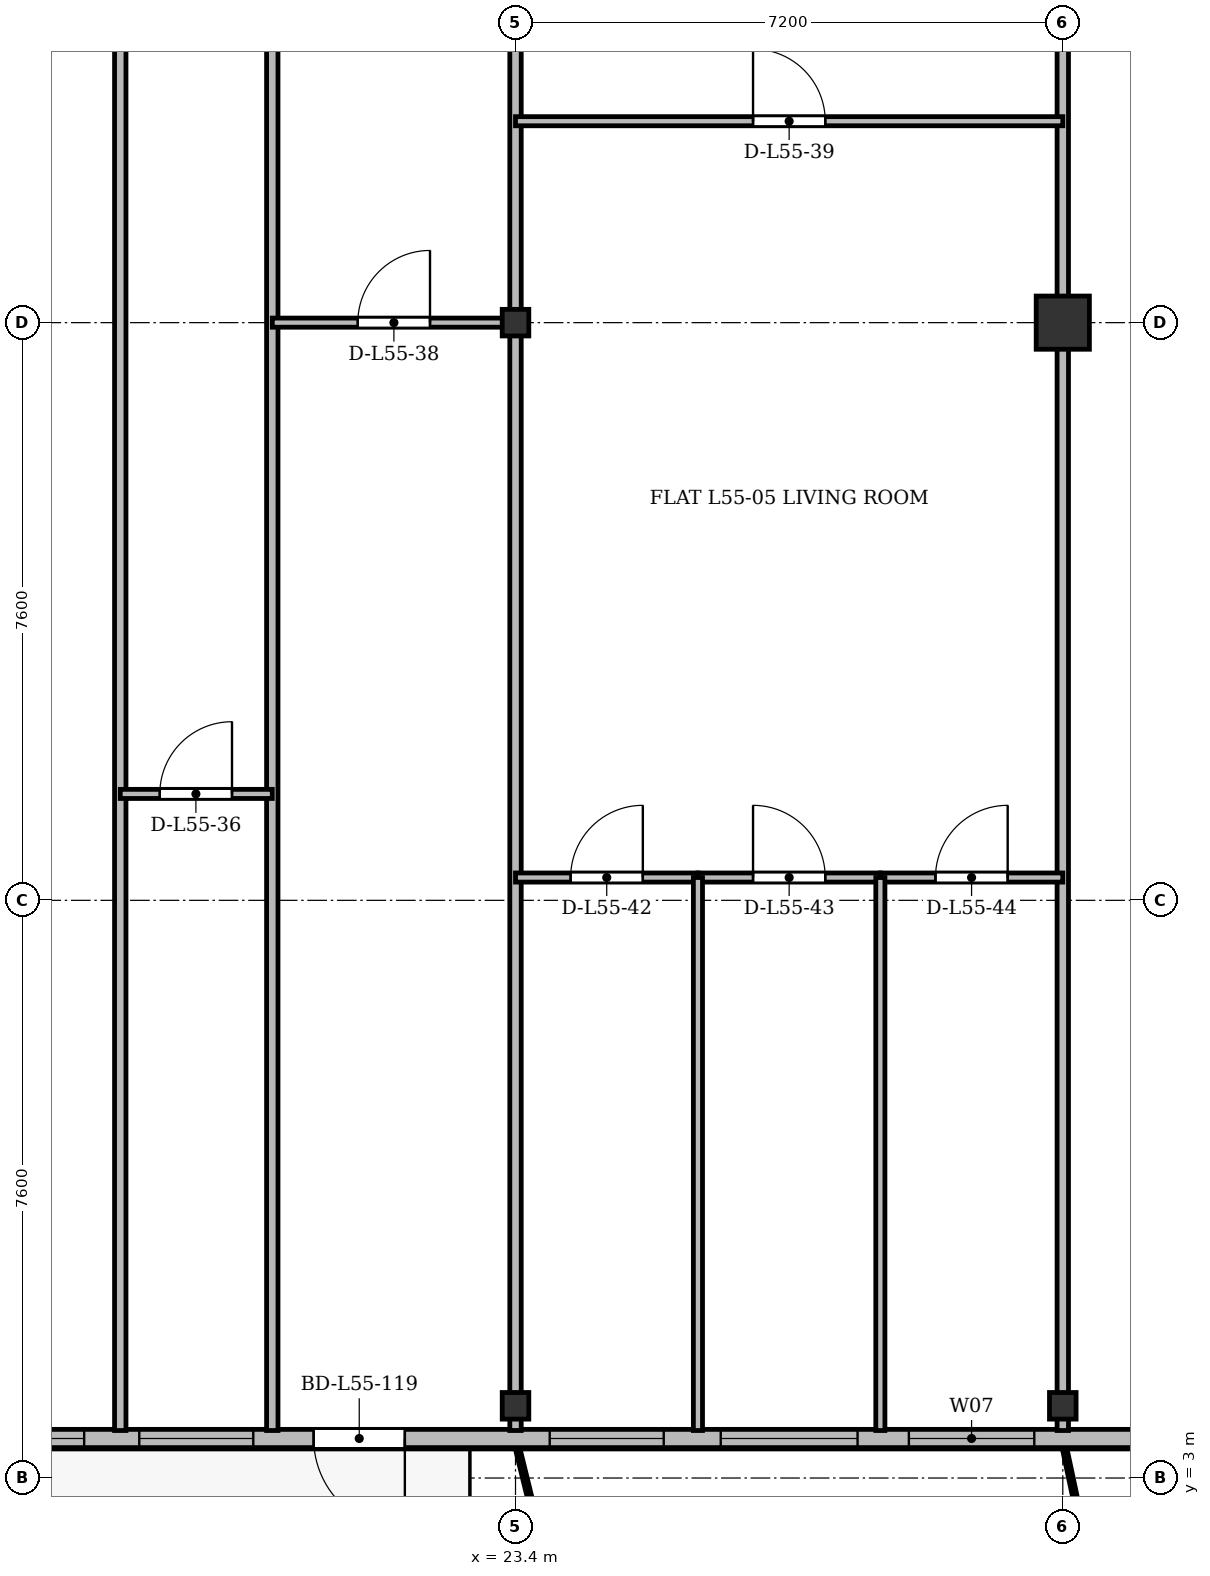
"""IFC4 building model, lengths in metres.
Left out: names, types, materials, properties, quantities, classifications, styles, units other than length and angle.
Written with IfcOpenShell. Run it as: python <this file> out.ifc"""

import sys

from ifc_helpers import new_model, si_unit, direction, frame, frame_2d, origin, origin_2d, place, context, subcontext, project, spatial, rectangle, i_section, extrude, source, transform, mapped, element, fill, save


model = new_model("IFC4")
c1 = context("Model", 3, precision=1e-05, world=origin(), true_north=direction((0.0, 1.0)))
c2 = subcontext(c1, "Body", "Model", "MODEL_VIEW")
j1 = project(units=[si_unit("LENGTHUNIT", "METRE"), si_unit("PLANEANGLEUNIT", "RADIAN")], contexts=[c1])
p1 = place(None, origin())
s1 = spatial("IfcSite", under=j1, at=p1, CompositionType="ELEMENT")
p2 = place(p1, origin())
s2 = spatial("IfcBuilding", under=s1, at=p2, CompositionType="ELEMENT")
p3 = place(p2, frame((0.0, 0.0, 212.1)))
s3 = spatial("IfcBuildingStorey", under=s2, at=p3, CompositionType="ELEMENT", Elevation=212.1)
m1 = source(origin(), c2, "Body", "SweptSolid", [
    extrude(i_section(OverallWidth=0.35, OverallDepth=0.35, WebThickness=0.018, FlangeThickness=0.028, at=origin_2d()), origin(), (0.0, 0.0, 1.0), 3.6),
])
for number, where, z_axis, x_axis in (
    (1, (23.4, 3.95, 0.0), (0.0, 0.0, 1.0), (1.0, 0.0, 0.0)),
    (2, (23.4, 18.2, 0.0), (0.0, 0.0, 1.0), (1.0, 0.0, 0.0)),
    (3, (30.6, 3.95, 0.0), (0.0, 0.0, 1.0), (1.0, 0.0, 0.0)),
):
    element("IfcColumn", number, at=place(p3, frame(where, z_axis=z_axis, x_axis=x_axis)), inside=s3, PredefinedType="COLUMN", context=c2, shape_type="MappedRepresentation", body=[
        mapped(m1, transform((0.0, 0.0, 0.0), x_axis=(1.0, 0.0, 0.0), y_axis=(0.0, 1.0, 0.0), z_axis=(0.0, 0.0, 1.0), scale=1.0)),
    ])
m2 = source(origin(), c2, "Body", "SweptSolid", [
    extrude(rectangle(XDim=0.7, YDim=0.7, at=origin_2d()), origin(), (0.0, 0.0, 1.0), 3.6),
])
p4 = place(p3, frame((30.6, 18.2, 0.0), z_axis=(0.0, 0.0, 1.0), x_axis=(1.0, 0.0, 0.0)))
e4 = element("IfcColumn", 4, at=p4, inside=s3, PredefinedType="COLUMN", context=c2, shape_type="MappedRepresentation", body=[
    mapped(m2, transform((0.0, 0.0, 0.0), x_axis=(1.0, 0.0, 0.0), y_axis=(0.0, 1.0, 0.0), z_axis=(0.0, 0.0, 1.0), scale=1.0)),
])
p5 = place(p3, frame((63.4, 3.52, 0.0), z_axis=(0.0, 0.0, 1.0), x_axis=(-1.0, 0.0, 0.0)))
e5 = element("IfcWall", 5, at=p5, inside=s3, PredefinedType="SOLIDWALL", context=c2, shape_type="SweptSolid", body=[
    extrude(rectangle(XDim=52.4, YDim=0.24, at=frame_2d((26.2, 0.0))), origin(), (0.0, 0.0, 1.0), 3.36),
])
p6 = place(p5, frame((1.445, 0.0, 0.9)))
e6 = element("IfcOpeningElement", 6, at=p6, cuts=e5, PredefinedType="OPENING", context=c2, shape_type="SweptSolid", body=[
    extrude(rectangle(XDim=1.8, YDim=1.8, at=frame_2d((0.9, 0.9))), frame((0.0, 0.13, 0.0), z_axis=(0.0, -1.0, 0.0), x_axis=(1.0, 0.0, 0.0)), (0.0, 0.0, 1.0), 0.26),
])
p7 = place(p5, frame((5.15, 0.0, 0.9)))
e7 = element("IfcOpeningElement", 7, at=p7, cuts=e5, PredefinedType="OPENING", context=c2, shape_type="SweptSolid", body=[
    extrude(rectangle(XDim=1.5, YDim=1.75, at=frame_2d((0.75, 0.875))), frame((0.0, 0.13, 0.0), z_axis=(0.0, -1.0, 0.0), x_axis=(1.0, 0.0, 0.0)), (0.0, 0.0, 1.0), 0.26),
])
p8 = place(p5, frame((7.45, 0.0, 0.9)))
e8 = element("IfcOpeningElement", 8, at=p8, cuts=e5, PredefinedType="OPENING", context=c2, shape_type="SweptSolid", body=[
    extrude(rectangle(XDim=1.5, YDim=1.75, at=frame_2d((0.75, 0.875))), frame((0.0, 0.13, 0.0), z_axis=(0.0, -1.0, 0.0), x_axis=(1.0, 0.0, 0.0)), (0.0, 0.0, 1.0), 0.26),
])
p9 = place(p5, frame((9.8, 0.0, 0.9)))
e9 = element("IfcOpeningElement", 9, at=p9, cuts=e5, PredefinedType="OPENING", context=c2, shape_type="SweptSolid", body=[
    extrude(rectangle(XDim=2.0, YDim=1.95, at=frame_2d((1.0, 0.975))), frame((0.0, 0.13, 0.0), z_axis=(0.0, -1.0, 0.0), x_axis=(1.0, 0.0, 0.0)), (0.0, 0.0, 1.0), 0.26),
])
p10 = place(p5, frame((14.217, 0.0, 0.0)))
e10 = element("IfcOpeningElement", 10, at=p10, cuts=e5, PredefinedType="OPENING", context=c2, shape_type="SweptSolid", body=[
    extrude(rectangle(XDim=1.2, YDim=2.2, at=frame_2d((0.6, 1.1))), frame((0.0, 0.13, 0.0), z_axis=(0.0, -1.0, 0.0), x_axis=(1.0, 0.0, 0.0)), (0.0, 0.0, 1.0), 0.26),
])
p11 = place(p5, frame((20.034, 0.0, 0.9)))
e11 = element("IfcOpeningElement", 11, at=p11, cuts=e5, PredefinedType="OPENING", context=c2, shape_type="SweptSolid", body=[
    extrude(rectangle(XDim=1.8, YDim=1.8, at=frame_2d((0.9, 0.9))), frame((0.0, 0.13, 0.0), z_axis=(0.0, -1.0, 0.0), x_axis=(1.0, 0.0, 0.0)), (0.0, 0.0, 1.0), 0.26),
])
p12 = place(p5, frame((22.5, 0.0, 0.9)))
e12 = element("IfcOpeningElement", 12, at=p12, cuts=e5, PredefinedType="OPENING", context=c2, shape_type="SweptSolid", body=[
    extrude(rectangle(XDim=2.2, YDim=1.8, at=frame_2d((1.1, 0.9))), frame((0.0, 0.13, 0.0), z_axis=(0.0, -1.0, 0.0), x_axis=(1.0, 0.0, 0.0)), (0.0, 0.0, 1.0), 0.26),
])
p13 = place(p5, frame((25.517, 0.0, 0.9)))
e13 = element("IfcOpeningElement", 13, at=p13, cuts=e5, PredefinedType="OPENING", context=c2, shape_type="SweptSolid", body=[
    extrude(rectangle(XDim=1.5, YDim=1.75, at=frame_2d((0.75, 0.875))), frame((0.0, 0.13, 0.0), z_axis=(0.0, -1.0, 0.0), x_axis=(1.0, 0.0, 0.0)), (0.0, 0.0, 1.0), 0.26),
])
p14 = place(p5, frame((29.2, 0.0, 0.9)))
e14 = element("IfcOpeningElement", 14, at=p14, cuts=e5, PredefinedType="OPENING", context=c2, shape_type="SweptSolid", body=[
    extrude(rectangle(XDim=2.0, YDim=1.95, at=frame_2d((1.0, 0.975))), frame((0.0, 0.13, 0.0), z_axis=(0.0, -1.0, 0.0), x_axis=(1.0, 0.0, 0.0)), (0.0, 0.0, 1.0), 0.26),
])
p15 = place(p5, frame((33.175, 0.0, 0.9)))
e15 = element("IfcOpeningElement", 15, at=p15, cuts=e5, PredefinedType="OPENING", context=c2, shape_type="SweptSolid", body=[
    extrude(rectangle(XDim=1.65, YDim=1.85, at=frame_2d((0.825, 0.925))), frame((0.0, 0.13, 0.0), z_axis=(0.0, -1.0, 0.0), x_axis=(1.0, 0.0, 0.0)), (0.0, 0.0, 1.0), 0.26),
])
p16 = place(p5, frame((35.5, 0.0, 0.9)))
e16 = element("IfcOpeningElement", 16, at=p16, cuts=e5, PredefinedType="OPENING", context=c2, shape_type="SweptSolid", body=[
    extrude(rectangle(XDim=1.8, YDim=1.8, at=frame_2d((0.9, 0.9))), frame((0.0, 0.13, 0.0), z_axis=(0.0, -1.0, 0.0), x_axis=(1.0, 0.0, 0.0)), (0.0, 0.0, 1.0), 0.26),
])
p17 = place(p5, frame((38.05, 0.0, 0.9)))
e17 = element("IfcOpeningElement", 17, at=p17, cuts=e5, PredefinedType="OPENING", context=c2, shape_type="SweptSolid", body=[
    extrude(rectangle(XDim=1.5, YDim=1.75, at=frame_2d((0.75, 0.875))), frame((0.0, 0.13, 0.0), z_axis=(0.0, -1.0, 0.0), x_axis=(1.0, 0.0, 0.0)), (0.0, 0.0, 1.0), 0.26),
])
p18 = place(p5, frame((41.456, 0.0, 0.0)))
e18 = element("IfcOpeningElement", 18, at=p18, cuts=e5, PredefinedType="OPENING", context=c2, shape_type="SweptSolid", body=[
    extrude(rectangle(XDim=1.2, YDim=2.2, at=frame_2d((0.6, 1.1))), frame((0.0, 0.13, 0.0), z_axis=(0.0, -1.0, 0.0), x_axis=(1.0, 0.0, 0.0)), (0.0, 0.0, 1.0), 0.26),
])
p19 = place(p5, frame((43.45, 0.0, 0.9)))
e19 = element("IfcOpeningElement", 19, at=p19, cuts=e5, PredefinedType="OPENING", context=c2, shape_type="SweptSolid", body=[
    extrude(rectangle(XDim=1.5, YDim=1.75, at=frame_2d((0.75, 0.875))), frame((0.0, 0.13, 0.0), z_axis=(0.0, -1.0, 0.0), x_axis=(1.0, 0.0, 0.0)), (0.0, 0.0, 1.0), 0.26),
])
p20 = place(p5, frame((45.675, 0.0, 0.9)))
e20 = element("IfcOpeningElement", 20, at=p20, cuts=e5, PredefinedType="OPENING", context=c2, shape_type="SweptSolid", body=[
    extrude(rectangle(XDim=1.65, YDim=1.85, at=frame_2d((0.825, 0.925))), frame((0.0, 0.13, 0.0), z_axis=(0.0, -1.0, 0.0), x_axis=(1.0, 0.0, 0.0)), (0.0, 0.0, 1.0), 0.26),
])
p21 = place(p5, frame((49.155, 0.0, 0.9)))
e21 = element("IfcOpeningElement", 21, at=p21, cuts=e5, PredefinedType="OPENING", context=c2, shape_type="SweptSolid", body=[
    extrude(rectangle(XDim=1.8, YDim=1.8, at=frame_2d((0.9, 0.9))), frame((0.0, 0.13, 0.0), z_axis=(0.0, -1.0, 0.0), x_axis=(1.0, 0.0, 0.0)), (0.0, 0.0, 1.0), 0.26),
])
for number, where, z_axis, x_axis in (
    (22, (23.4, 3.625, 0.0), (0.0, 0.0, 1.0), (0.0, 1.0, 0.0)),
    (23, (30.6, 3.625, 0.0), (0.0, 0.0, 1.0), (0.0, 1.0, 0.0)),
):
    element("IfcWall", number, at=place(p3, frame(where, z_axis=z_axis, x_axis=x_axis)), inside=s3, PredefinedType="PARTITIONING", context=c2, shape_type="SweptSolid", body=[
        extrude(rectangle(XDim=27.175, YDim=0.15, at=frame_2d((13.587, 0.0))), origin(), (0.0, 0.0, 1.0), 2.86),
    ])
for number, where, z_axis, x_axis in (
    (24, (18.2, 3.625, 0.0), (0.0, 0.0, 1.0), (0.0, 1.0, 0.0)),
    (25, (20.2, 3.625, 0.0), (0.0, 0.0, 1.0), (0.0, 1.0, 0.0)),
):
    element("IfcWall", number, at=place(p3, frame(where, z_axis=z_axis, x_axis=x_axis)), inside=s3, PredefinedType="PARTITIONING", context=c2, shape_type="SweptSolid", body=[
        extrude(rectangle(XDim=27.175, YDim=0.15, at=frame_2d((13.587, 0.0))), origin(), (0.0, 0.0, 1.0), 2.91),
    ])
p22 = place(p3, frame((18.2, 12.0, 0.0), z_axis=(0.0, 0.0, 1.0), x_axis=(1.0, 0.0, 0.0)))
e26 = element("IfcWall", 26, at=p22, inside=s3, PredefinedType="PARTITIONING", context=c2, shape_type="SweptSolid", body=[
    extrude(rectangle(XDim=2.0, YDim=0.12, at=frame_2d((1.0, 0.0))), origin(), (0.0, 0.0, 1.0), 3.36),
])
p23 = place(p22, frame((0.52, 0.0, 0.0)))
e27 = element("IfcOpeningElement", 27, at=p23, cuts=e26, PredefinedType="OPENING", context=c2, shape_type="SweptSolid", body=[
    extrude(rectangle(XDim=0.95, YDim=2.15, at=frame_2d((0.475, 1.075))), frame((0.0, 0.07, 0.0), z_axis=(0.0, -1.0, 0.0), x_axis=(1.0, 0.0, 0.0)), (0.0, 0.0, 1.0), 0.14),
])
p24 = place(p3, frame((20.2, 18.2, 0.0), z_axis=(0.0, 0.0, 1.0), x_axis=(1.0, 0.0, 0.0)))
e28 = element("IfcWall", 28, at=p24, inside=s3, PredefinedType="PARTITIONING", context=c2, shape_type="SweptSolid", body=[
    extrude(rectangle(XDim=3.2, YDim=0.12, at=frame_2d((1.6, 0.0))), origin(), (0.0, 0.0, 1.0), 2.91),
])
p25 = place(p24, frame((1.125, 0.0, 0.0)))
e29 = element("IfcOpeningElement", 29, at=p25, cuts=e28, PredefinedType="OPENING", context=c2, shape_type="SweptSolid", body=[
    extrude(rectangle(XDim=0.95, YDim=2.15, at=frame_2d((0.475, 1.075))), frame((0.0, 0.07, 0.0), z_axis=(0.0, -1.0, 0.0), x_axis=(1.0, 0.0, 0.0)), (0.0, 0.0, 1.0), 0.14),
])
p26 = place(p3, frame((23.4, 20.85, 0.0), z_axis=(0.0, 0.0, 1.0), x_axis=(1.0, 0.0, 0.0)))
e30 = element("IfcWall", 30, at=p26, inside=s3, PredefinedType="PARTITIONING", context=c2, shape_type="SweptSolid", body=[
    extrude(rectangle(XDim=7.2, YDim=0.12, at=frame_2d((3.6, 0.0))), origin(), (0.0, 0.0, 1.0), 2.86),
])
p27 = place(p26, frame((3.125, 0.0, 0.0)))
e31 = element("IfcOpeningElement", 31, at=p27, cuts=e30, PredefinedType="OPENING", context=c2, shape_type="SweptSolid", body=[
    extrude(rectangle(XDim=0.95, YDim=2.15, at=frame_2d((0.475, 1.075))), frame((0.0, 0.07, 0.0), z_axis=(0.0, -1.0, 0.0), x_axis=(1.0, 0.0, 0.0)), (0.0, 0.0, 1.0), 0.14),
])
p28 = place(p3, frame((23.4, 10.9, 0.0), z_axis=(0.0, 0.0, 1.0), x_axis=(1.0, 0.0, 0.0)))
e32 = element("IfcWall", 32, at=p28, inside=s3, PredefinedType="PARTITIONING", context=c2, shape_type="SweptSolid", body=[
    extrude(rectangle(XDim=2.4, YDim=0.12, at=frame_2d((1.2, 0.0))), origin(), (0.0, 0.0, 1.0), 2.86),
])
p29 = place(p28, frame((0.725, 0.0, 0.0)))
e33 = element("IfcOpeningElement", 33, at=p29, cuts=e32, PredefinedType="OPENING", context=c2, shape_type="SweptSolid", body=[
    extrude(rectangle(XDim=0.95, YDim=2.15, at=frame_2d((0.475, 1.075))), frame((0.0, 0.07, 0.0), z_axis=(0.0, -1.0, 0.0), x_axis=(1.0, 0.0, 0.0)), (0.0, 0.0, 1.0), 0.14),
])
p30 = place(p3, frame((25.8, 10.9, 0.0), z_axis=(0.0, 0.0, 1.0), x_axis=(1.0, 0.0, 0.0)))
e34 = element("IfcWall", 34, at=p30, inside=s3, PredefinedType="PARTITIONING", context=c2, shape_type="SweptSolid", body=[
    extrude(rectangle(XDim=2.4, YDim=0.12, at=frame_2d((1.2, 0.0))), origin(), (0.0, 0.0, 1.0), 3.36),
])
p31 = place(p30, frame((0.725, 0.0, 0.0)))
e35 = element("IfcOpeningElement", 35, at=p31, cuts=e34, PredefinedType="OPENING", context=c2, shape_type="SweptSolid", body=[
    extrude(rectangle(XDim=0.95, YDim=2.15, at=frame_2d((0.475, 1.075))), frame((0.0, 0.07, 0.0), z_axis=(0.0, -1.0, 0.0), x_axis=(1.0, 0.0, 0.0)), (0.0, 0.0, 1.0), 0.14),
])
p32 = place(p3, frame((25.8, 3.625, 0.0), z_axis=(0.0, 0.0, 1.0), x_axis=(0.0, 1.0, 0.0)))
e36 = element("IfcWall", 36, at=p32, inside=s3, PredefinedType="PARTITIONING", context=c2, shape_type="SweptSolid", body=[
    extrude(rectangle(XDim=7.275, YDim=0.12, at=frame_2d((3.637, 0.0))), origin(), (0.0, 0.0, 1.0), 2.91),
])
p33 = place(p3, frame((28.2, 10.9, 0.0), z_axis=(0.0, 0.0, 1.0), x_axis=(1.0, 0.0, 0.0)))
e37 = element("IfcWall", 37, at=p33, inside=s3, PredefinedType="PARTITIONING", context=c2, shape_type="SweptSolid", body=[
    extrude(rectangle(XDim=2.4, YDim=0.12, at=frame_2d((1.2, 0.0))), origin(), (0.0, 0.0, 1.0), 2.86),
])
p34 = place(p33, frame((0.725, 0.0, 0.0)))
e38 = element("IfcOpeningElement", 38, at=p34, cuts=e37, PredefinedType="OPENING", context=c2, shape_type="SweptSolid", body=[
    extrude(rectangle(XDim=0.95, YDim=2.15, at=frame_2d((0.475, 1.075))), frame((0.0, 0.07, 0.0), z_axis=(0.0, -1.0, 0.0), x_axis=(1.0, 0.0, 0.0)), (0.0, 0.0, 1.0), 0.14),
])
p35 = place(p3, frame((28.2, 3.625, 0.0), z_axis=(0.0, 0.0, 1.0), x_axis=(0.0, 1.0, 0.0)))
e39 = element("IfcWall", 39, at=p35, inside=s3, PredefinedType="PARTITIONING", context=c2, shape_type="SweptSolid", body=[
    extrude(rectangle(XDim=7.275, YDim=0.12, at=frame_2d((3.637, 0.0))), origin(), (0.0, 0.0, 1.0), 2.91),
])
m3 = source(origin(), c2, "Body", "SweptSolid", [
    extrude(rectangle(XDim=1.65, YDim=1.85, at=frame_2d((0.825, 0.925))), frame((0.0, 0.03, 0.0), z_axis=(0.0, -1.0, 0.0), x_axis=(1.0, 0.0, 0.0)), (0.0, 0.0, 1.0), 0.06),
])
p36 = place(p15, origin())
e40 = element("IfcWindow", 40, at=p36, inside=s3, PartitioningType="SINGLE_PANEL", PredefinedType="WINDOW", context=c2, shape_type="MappedRepresentation", body=[
    mapped(m3, transform((0.0, 0.0, 0.0), x_axis=(1.0, 0.0, 0.0), y_axis=(0.0, 1.0, 0.0), z_axis=(0.0, 0.0, 1.0), scale=1.0)),
])
fill(e15, e40)
m4 = source(origin(), c2, "Body", "SweptSolid", [
    extrude(rectangle(XDim=1.8, YDim=1.8, at=frame_2d((0.9, 0.9))), frame((0.0, 0.03, 0.0), z_axis=(0.0, -1.0, 0.0), x_axis=(1.0, 0.0, 0.0)), (0.0, 0.0, 1.0), 0.06),
])
p37 = place(p16, origin())
e41 = element("IfcWindow", 41, at=p37, inside=s3, PartitioningType="SINGLE_PANEL", PredefinedType="WINDOW", context=c2, shape_type="MappedRepresentation", body=[
    mapped(m4, transform((0.0, 0.0, 0.0), x_axis=(1.0, 0.0, 0.0), y_axis=(0.0, 1.0, 0.0), z_axis=(0.0, 0.0, 1.0), scale=1.0)),
])
fill(e16, e41)
m5 = source(origin(), c2, "Body", "SweptSolid", [
    extrude(rectangle(XDim=1.5, YDim=1.75, at=frame_2d((0.75, 0.875))), frame((0.0, 0.03, 0.0), z_axis=(0.0, -1.0, 0.0), x_axis=(1.0, 0.0, 0.0)), (0.0, 0.0, 1.0), 0.06),
])
p38 = place(p17, origin())
e42 = element("IfcWindow", 42, at=p38, inside=s3, PartitioningType="SINGLE_PANEL", PredefinedType="WINDOW", context=c2, shape_type="MappedRepresentation", body=[
    mapped(m5, transform((0.0, 0.0, 0.0), x_axis=(1.0, 0.0, 0.0), y_axis=(0.0, 1.0, 0.0), z_axis=(0.0, 0.0, 1.0), scale=1.0)),
])
fill(e17, e42)
m6 = source(origin(), c2, "Body", "SweptSolid", [
    extrude(rectangle(XDim=1.2, YDim=2.2, at=frame_2d((0.6, 1.1))), frame((0.0, 0.025, 0.0), z_axis=(0.0, -1.0, 0.0), x_axis=(1.0, 0.0, 0.0)), (0.0, 0.0, 1.0), 0.05),
])
p39 = place(p18, origin())
e43 = element("IfcDoor", 43, at=p39, inside=s3, OperationType="SINGLE_SWING_LEFT", PredefinedType="DOOR", context=c2, shape_type="MappedRepresentation", body=[
    mapped(m6, transform((0.0, 0.0, 0.0), x_axis=(1.0, 0.0, 0.0), y_axis=(0.0, 1.0, 0.0), z_axis=(0.0, 0.0, 1.0), scale=1.0)),
])
fill(e18, e43)
p40 = place(p19, origin())
e44 = element("IfcWindow", 44, at=p40, inside=s3, PartitioningType="SINGLE_PANEL", PredefinedType="WINDOW", context=c2, shape_type="MappedRepresentation", body=[
    mapped(m5, transform((0.0, 0.0, 0.0), x_axis=(1.0, 0.0, 0.0), y_axis=(0.0, 1.0, 0.0), z_axis=(0.0, 0.0, 1.0), scale=1.0)),
])
fill(e19, e44)
p41 = place(p20, origin())
e45 = element("IfcWindow", 45, at=p41, inside=s3, PartitioningType="SINGLE_PANEL", PredefinedType="WINDOW", context=c2, shape_type="MappedRepresentation", body=[
    mapped(m3, transform((0.0, 0.0, 0.0), x_axis=(1.0, 0.0, 0.0), y_axis=(0.0, 1.0, 0.0), z_axis=(0.0, 0.0, 1.0), scale=1.0)),
])
fill(e20, e45)
m7 = source(origin(), c2, "Body", "SweptSolid", [
    extrude(rectangle(XDim=0.95, YDim=2.15, at=frame_2d((0.475, 1.075))), frame((0.0, 0.025, 0.0), z_axis=(0.0, -1.0, 0.0), x_axis=(1.0, 0.0, 0.0)), (0.0, 0.0, 1.0), 0.05),
])
p42 = place(p23, origin())
e46 = element("IfcDoor", 46, at=p42, inside=s3, OperationType="SINGLE_SWING_RIGHT", PredefinedType="DOOR", context=c2, shape_type="MappedRepresentation", body=[
    mapped(m7, transform((0.0, 0.0, 0.0), x_axis=(1.0, 0.0, 0.0), y_axis=(0.0, 1.0, 0.0), z_axis=(0.0, 0.0, 1.0), scale=1.0)),
])
fill(e27, e46)
p43 = place(p25, origin())
e47 = element("IfcDoor", 47, at=p43, inside=s3, OperationType="SINGLE_SWING_RIGHT", PredefinedType="DOOR", context=c2, shape_type="MappedRepresentation", body=[
    mapped(m7, transform((0.0, 0.0, 0.0), x_axis=(1.0, 0.0, 0.0), y_axis=(0.0, 1.0, 0.0), z_axis=(0.0, 0.0, 1.0), scale=1.0)),
])
fill(e29, e47)
p44 = place(p27, origin())
e48 = element("IfcDoor", 48, at=p44, inside=s3, OperationType="SINGLE_SWING_LEFT", PredefinedType="DOOR", context=c2, shape_type="MappedRepresentation", body=[
    mapped(m7, transform((0.0, 0.0, 0.0), x_axis=(1.0, 0.0, 0.0), y_axis=(0.0, 1.0, 0.0), z_axis=(0.0, 0.0, 1.0), scale=1.0)),
])
fill(e31, e48)
p45 = place(p29, origin())
e49 = element("IfcDoor", 49, at=p45, inside=s3, OperationType="SINGLE_SWING_RIGHT", PredefinedType="DOOR", context=c2, shape_type="MappedRepresentation", body=[
    mapped(m7, transform((0.0, 0.0, 0.0), x_axis=(1.0, 0.0, 0.0), y_axis=(0.0, 1.0, 0.0), z_axis=(0.0, 0.0, 1.0), scale=1.0)),
])
fill(e33, e49)
p46 = place(p31, origin())
e50 = element("IfcDoor", 50, at=p46, inside=s3, OperationType="SINGLE_SWING_LEFT", PredefinedType="DOOR", context=c2, shape_type="MappedRepresentation", body=[
    mapped(m7, transform((0.0, 0.0, 0.0), x_axis=(1.0, 0.0, 0.0), y_axis=(0.0, 1.0, 0.0), z_axis=(0.0, 0.0, 1.0), scale=1.0)),
])
fill(e35, e50)
p47 = place(p34, origin())
e51 = element("IfcDoor", 51, at=p47, inside=s3, OperationType="SINGLE_SWING_RIGHT", PredefinedType="DOOR", context=c2, shape_type="MappedRepresentation", body=[
    mapped(m7, transform((0.0, 0.0, 0.0), x_axis=(1.0, 0.0, 0.0), y_axis=(0.0, 1.0, 0.0), z_axis=(0.0, 0.0, 1.0), scale=1.0)),
])
fill(e38, e51)
save(model, sys.argv[1])
